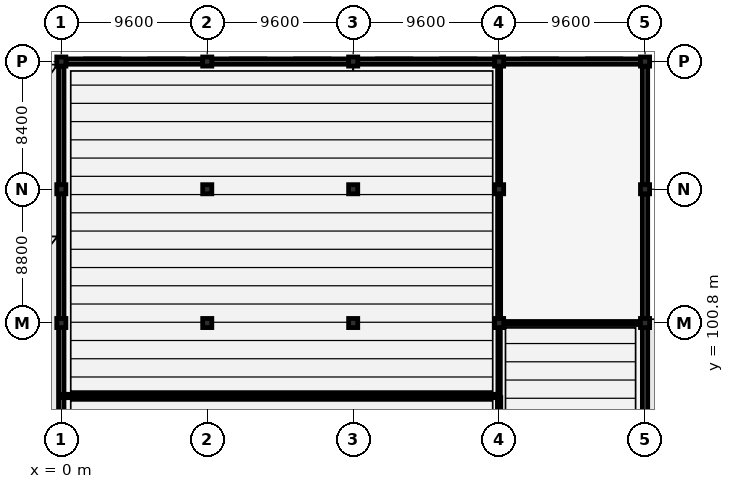
"""IFC4 building model, lengths in metres.
Left out: names, types, materials, properties, quantities, classifications, styles, units other than length and angle.
Written with IfcOpenShell. Run it as: python <this file> out.ifc"""

import sys

from ifc_helpers import new_model, si_unit, direction, frame, frame_2d, origin, origin_2d, place, context, subcontext, project, spatial, rectangle, extrude, element, fill, save


model = new_model("IFC4")
c1 = context("Model", 3, precision=1e-05, world=origin(), true_north=direction((0.0, 1.0)))
c2 = subcontext(c1, "Body", "Model", "MODEL_VIEW")
j1 = project(units=[si_unit("LENGTHUNIT", "METRE"), si_unit("PLANEANGLEUNIT", "RADIAN")], contexts=[c1])
p1 = place(None, origin())
s1 = spatial("IfcSite", under=j1, at=p1, CompositionType="ELEMENT")
p2 = place(p1, origin())
s2 = spatial("IfcBuilding", under=s1, at=p2, CompositionType="ELEMENT")
p3 = place(p2, origin())
s3 = spatial("IfcBuildingStorey", under=s2, at=p3, CompositionType="ELEMENT", Elevation=0.0)
for number, where, z_axis, x_axis in (
    (1, (0.0, 100.8, 0.0), (0.0, 0.0, 1.0), (1.0, 0.0, 0.0)),
    (2, (0.0, 109.6, 0.0), (0.0, 0.0, 1.0), (1.0, 0.0, 0.0)),
    (3, (0.0, 118.0, 0.0), (0.0, 0.0, 1.0), (1.0, 0.0, 0.0)),
    (4, (9.6, 100.8, 0.0), (0.0, 0.0, 1.0), (1.0, 0.0, 0.0)),
    (5, (9.6, 109.6, 0.0), (0.0, 0.0, 1.0), (1.0, 0.0, 0.0)),
    (6, (9.6, 118.0, 0.0), (0.0, 0.0, 1.0), (1.0, 0.0, 0.0)),
    (7, (19.2, 100.8, 0.0), (0.0, 0.0, 1.0), (1.0, 0.0, 0.0)),
    (8, (19.2, 109.6, 0.0), (0.0, 0.0, 1.0), (1.0, 0.0, 0.0)),
    (9, (19.2, 118.0, 0.0), (0.0, 0.0, 1.0), (1.0, 0.0, 0.0)),
    (10, (28.8, 100.8, 0.0), (0.0, 0.0, 1.0), (1.0, 0.0, 0.0)),
    (11, (28.8, 109.6, 0.0), (0.0, 0.0, 1.0), (1.0, 0.0, 0.0)),
    (12, (28.8, 118.0, 0.0), (0.0, 0.0, 1.0), (1.0, 0.0, 0.0)),
    (13, (38.4, 100.8, 0.0), (0.0, 0.0, 1.0), (1.0, 0.0, 0.0)),
    (14, (38.4, 109.6, 0.0), (0.0, 0.0, 1.0), (1.0, 0.0, 0.0)),
    (15, (38.4, 118.0, 0.0), (0.0, 0.0, 1.0), (1.0, 0.0, 0.0)),
):
    element("IfcColumn", number, at=place(p3, frame(where, z_axis=z_axis, x_axis=x_axis)), inside=s3, PredefinedType="COLUMN", context=c2, shape_type="SweptSolid", body=[
        extrude(rectangle(XDim=0.6, YDim=0.6, at=origin_2d()), origin(), (0.0, 0.0, 1.0), 4.8),
    ])
p4 = place(p3, frame((0.3, 118.0, 0.0), z_axis=(0.0, 0.0, 1.0), x_axis=(1.0, 0.0, 0.0)))
e16 = element("IfcWall", 16, at=p4, inside=s3, PredefinedType="SOLIDWALL", context=c2, shape_type="SweptSolid", body=[
    extrude(rectangle(XDim=9.0, YDim=0.35, at=frame_2d((4.5, 0.0))), origin(), (0.0, 0.0, 1.0), 4.1),
])
p5 = place(p4, frame((2.8, 0.0, 0.0)))
e17 = element("IfcOpeningElement", 17, at=p5, cuts=e16, PredefinedType="OPENING", context=c2, shape_type="SweptSolid", body=[
    extrude(rectangle(XDim=2.96, YDim=3.17, at=frame_2d((1.48, 1.585))), frame((0.0, 0.185, 0.0), z_axis=(0.0, -1.0, 0.0), x_axis=(1.0, 0.0, 0.0)), (0.0, 0.0, 1.0), 0.37),
])
p6 = place(p3, frame((9.9, 118.0, 0.0), z_axis=(0.0, 0.0, 1.0), x_axis=(1.0, 0.0, 0.0)))
e18 = element("IfcWall", 18, at=p6, inside=s3, PredefinedType="SOLIDWALL", context=c2, shape_type="SweptSolid", body=[
    extrude(rectangle(XDim=9.0, YDim=0.35, at=frame_2d((4.5, 0.0))), origin(), (0.0, 0.0, 1.0), 4.1),
])
p7 = place(p6, frame((2.8, 0.0, 0.0)))
e19 = element("IfcOpeningElement", 19, at=p7, cuts=e18, PredefinedType="OPENING", context=c2, shape_type="SweptSolid", body=[
    extrude(rectangle(XDim=2.92, YDim=3.14, at=frame_2d((1.46, 1.57))), frame((0.0, 0.185, 0.0), z_axis=(0.0, -1.0, 0.0), x_axis=(1.0, 0.0, 0.0)), (0.0, 0.0, 1.0), 0.37),
])
p8 = place(p3, frame((19.5, 118.0, 0.0), z_axis=(0.0, 0.0, 1.0), x_axis=(1.0, 0.0, 0.0)))
e20 = element("IfcWall", 20, at=p8, inside=s3, PredefinedType="SOLIDWALL", context=c2, shape_type="SweptSolid", body=[
    extrude(rectangle(XDim=9.0, YDim=0.35, at=frame_2d((4.5, 0.0))), origin(), (0.0, 0.0, 1.0), 4.1),
])
p9 = place(p8, frame((2.5, 0.0, 0.0)))
e21 = element("IfcOpeningElement", 21, at=p9, cuts=e20, PredefinedType="OPENING", context=c2, shape_type="SweptSolid", body=[
    extrude(rectangle(XDim=3.6, YDim=2.8, at=frame_2d((1.8, 1.4))), frame((0.0, 0.185, 0.0), z_axis=(0.0, -1.0, 0.0), x_axis=(1.0, 0.0, 0.0)), (0.0, 0.0, 1.0), 0.37),
])
for number, where, z_axis, x_axis in (
    (22, (29.1, 118.0, 0.0), (0.0, 0.0, 1.0), (1.0, 0.0, 0.0)),
    (23, (0.0, 91.5, 0.0), (0.0, 0.0, 1.0), (0.0, 1.0, 0.0)),
    (24, (38.4, 91.5, 0.0), (0.0, 0.0, 1.0), (0.0, 1.0, 0.0)),
):
    element("IfcWall", number, at=place(p3, frame(where, z_axis=z_axis, x_axis=x_axis)), inside=s3, PredefinedType="SOLIDWALL", context=c2, shape_type="SweptSolid", body=[
        extrude(rectangle(XDim=9.0, YDim=0.35, at=frame_2d((4.5, 0.0))), origin(), (0.0, 0.0, 1.0), 4.1),
    ])
for number, where, z_axis, x_axis in (
    (25, (0.0, 101.1, 0.0), (0.0, 0.0, 1.0), (0.0, 1.0, 0.0)),
    (26, (38.4, 101.1, 0.0), (0.0, 0.0, 1.0), (0.0, 1.0, 0.0)),
):
    element("IfcWall", number, at=place(p3, frame(where, z_axis=z_axis, x_axis=x_axis)), inside=s3, PredefinedType="SOLIDWALL", context=c2, shape_type="SweptSolid", body=[
        extrude(rectangle(XDim=8.2, YDim=0.35, at=frame_2d((4.1, 0.0))), origin(), (0.0, 0.0, 1.0), 4.1),
    ])
for number, where, z_axis, x_axis in (
    (27, (0.0, 109.9, 0.0), (0.0, 0.0, 1.0), (0.0, 1.0, 0.0)),
    (28, (38.4, 109.9, 0.0), (0.0, 0.0, 1.0), (0.0, 1.0, 0.0)),
):
    element("IfcWall", number, at=place(p3, frame(where, z_axis=z_axis, x_axis=x_axis)), inside=s3, PredefinedType="SOLIDWALL", context=c2, shape_type="SweptSolid", body=[
        extrude(rectangle(XDim=7.8, YDim=0.35, at=frame_2d((3.9, 0.0))), origin(), (0.0, 0.0, 1.0), 4.1),
    ])
p10 = place(p2, frame((0.0, 0.0, -4.2)))
s4 = spatial("IfcBuildingStorey", under=s2, at=p10, CompositionType="ELEMENT", Elevation=-4.2)
p11 = place(p10, frame((38.575, 95.0, 0.0), z_axis=(0.0, 0.0, 1.0), x_axis=(1.0, 0.0, 0.0)))
e29 = element("IfcWall", 29, at=p11, inside=s4, PredefinedType="SOLIDWALL", context=c2, shape_type="SweptSolid", body=[
    extrude(rectangle(XDim=9.25, YDim=0.4, at=frame_2d((4.625, 0.0))), origin(), (0.0, 0.0, 1.0), 9.0),
])
p12 = place(p3, frame((0.05, 96.0, 0.0), z_axis=(0.0, 0.0, 1.0), x_axis=(1.0, 0.0, 0.0)))
e30 = element("IfcWall", 30, at=p12, inside=s3, PredefinedType="PARTITIONING", context=c2, shape_type="SweptSolid", body=[
    extrude(rectangle(XDim=28.55, YDim=0.22, at=frame_2d((14.275, 0.0))), origin(), (0.0, 0.0, 1.0), 4.4),
])
p13 = place(p3, frame((28.8, 100.9, 0.0), z_axis=(0.0, 0.0, 1.0), x_axis=(0.0, 1.0, 0.0)))
e31 = element("IfcWall", 31, at=p13, inside=s3, PredefinedType="PARTITIONING", context=c2, shape_type="SweptSolid", body=[
    extrude(rectangle(XDim=17.05, YDim=0.2, at=frame_2d((8.525, 0.0))), origin(), (0.0, 0.0, 1.0), 3.69),
])
p14 = place(p3, frame((28.8, 96.1, 0.0), z_axis=(0.0, 0.0, 1.0), x_axis=(0.0, 1.0, 0.0)))
e32 = element("IfcWall", 32, at=p14, inside=s3, PredefinedType="PARTITIONING", context=c2, shape_type="SweptSolid", body=[
    extrude(rectangle(XDim=4.6, YDim=0.16, at=frame_2d((2.3, 0.0))), origin(), (0.0, 0.0, 1.0), 3.69),
])
p15 = place(p14, frame((1.4, 0.0, 0.0)))
e33 = element("IfcOpeningElement", 33, at=p15, cuts=e32, PredefinedType="OPENING", context=c2, shape_type="SweptSolid", body=[
    extrude(rectangle(XDim=1.8, YDim=2.15, at=frame_2d((0.9, 1.075))), frame((0.0, 0.09, 0.0), z_axis=(0.0, -1.0, 0.0), x_axis=(1.0, 0.0, 0.0)), (0.0, 0.0, 1.0), 0.18),
])
p16 = place(p3, frame((28.8, 81.7, 0.0), z_axis=(0.0, 0.0, 1.0), x_axis=(0.0, 1.0, 0.0)))
e34 = element("IfcWall", 34, at=p16, inside=s3, PredefinedType="PARTITIONING", context=c2, shape_type="SweptSolid", body=[
    extrude(rectangle(XDim=14.2, YDim=0.22, at=frame_2d((7.1, 0.0))), origin(), (0.0, 0.0, 1.0), 3.69),
])
p17 = place(p16, frame((6.35, 0.0, 0.0)))
e35 = element("IfcOpeningElement", 35, at=p17, cuts=e34, PredefinedType="OPENING", context=c2, shape_type="SweptSolid", body=[
    extrude(rectangle(XDim=1.5, YDim=2.2, at=frame_2d((0.75, 1.1))), frame((0.0, 0.12, 0.0), z_axis=(0.0, -1.0, 0.0), x_axis=(1.0, 0.0, 0.0)), (0.0, 0.0, 1.0), 0.24),
])
p18 = place(p3, frame((29.0, 100.8, 0.0), z_axis=(0.0, 0.0, 1.0), x_axis=(1.0, 0.0, 0.0)))
e36 = element("IfcWall", 36, at=p18, inside=s3, PredefinedType="PARTITIONING", context=c2, shape_type="SweptSolid", body=[
    extrude(rectangle(XDim=9.35, YDim=0.2, at=frame_2d((4.675, 0.0))), origin(), (0.0, 0.0, 1.0), 3.75),
])
p19 = place(p18, frame((3.875, 0.0, 0.0)))
e37 = element("IfcOpeningElement", 37, at=p19, cuts=e36, PredefinedType="OPENING", context=c2, shape_type="SweptSolid", body=[
    extrude(rectangle(XDim=1.6, YDim=2.2, at=frame_2d((0.8, 1.1))), frame((0.0, 0.11, 0.0), z_axis=(0.0, -1.0, 0.0), x_axis=(1.0, 0.0, 0.0)), (0.0, 0.0, 1.0), 0.22),
])
p20 = place(p5, origin())
e38 = element("IfcDoor", 38, at=p20, inside=s3, OperationType="ROLLINGUP", PredefinedType="DOOR", context=c2, shape_type="SweptSolid", body=[
    extrude(rectangle(XDim=2.96, YDim=3.17, at=frame_2d((1.48, 1.585))), frame((0.0, 0.025, 0.0), z_axis=(0.0, -1.0, 0.0), x_axis=(1.0, 0.0, 0.0)), (0.0, 0.0, 1.0), 0.05),
])
fill(e17, e38)
p21 = place(p7, origin())
e39 = element("IfcDoor", 39, at=p21, inside=s3, OperationType="ROLLINGUP", PredefinedType="DOOR", context=c2, shape_type="SweptSolid", body=[
    extrude(rectangle(XDim=2.92, YDim=3.14, at=frame_2d((1.46, 1.57))), frame((0.0, 0.025, 0.0), z_axis=(0.0, -1.0, 0.0), x_axis=(1.0, 0.0, 0.0)), (0.0, 0.0, 1.0), 0.05),
])
fill(e19, e39)
p22 = place(p9, origin())
e40 = element("IfcDoor", 40, at=p22, inside=s3, OperationType="FOLDING_TO_LEFT", PredefinedType="DOOR", context=c2, shape_type="SweptSolid", body=[
    extrude(rectangle(XDim=3.6, YDim=2.8, at=frame_2d((1.8, 1.4))), frame((0.0, 0.025, 0.0), z_axis=(0.0, -1.0, 0.0), x_axis=(1.0, 0.0, 0.0)), (0.0, 0.0, 1.0), 0.05),
])
fill(e21, e40)
p23 = place(p15, origin())
e41 = element("IfcDoor", 41, at=p23, inside=s3, OperationType="DOUBLE_DOOR_SINGLE_SWING", PredefinedType="DOOR", context=c2, shape_type="SweptSolid", body=[
    extrude(rectangle(XDim=1.8, YDim=2.15, at=frame_2d((0.9, 1.075))), frame((0.0, 0.025, 0.0), z_axis=(0.0, -1.0, 0.0), x_axis=(1.0, 0.0, 0.0)), (0.0, 0.0, 1.0), 0.05),
])
fill(e33, e41)
p24 = place(p19, origin())
e42 = element("IfcDoor", 42, at=p24, inside=s3, OperationType="DOUBLE_DOOR_SINGLE_SWING", PredefinedType="DOOR", context=c2, shape_type="SweptSolid", body=[
    extrude(rectangle(XDim=1.6, YDim=2.2, at=frame_2d((0.8, 1.1))), frame((0.0, 0.025, 0.0), z_axis=(0.0, -1.0, 0.0), x_axis=(1.0, 0.0, 0.0)), (0.0, 0.0, 1.0), 0.05),
])
fill(e37, e42)
save(model, sys.argv[1])
